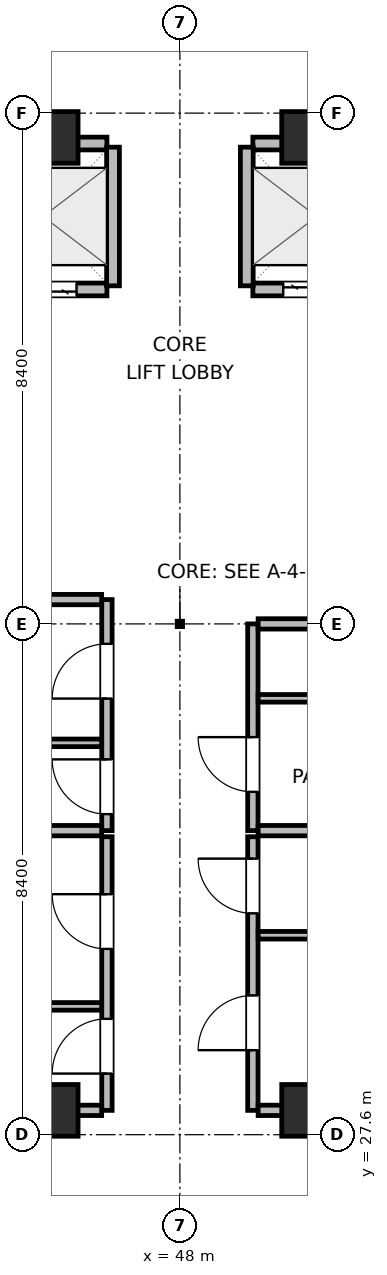
"""IFC4 building model, lengths in metres.
Left out: names, types, materials, properties, quantities, classifications, styles, units other than length and angle.
Written with IfcOpenShell. Run it as: python <this file> out.ifc"""

import sys

from ifc_helpers import new_model, si_unit, direction, frame, frame_2d, origin, origin_2d, place, context, subcontext, project, spatial, rectangle, extrude, element, fill, save


model = new_model("IFC4")
c1 = context("Model", 3, precision=1e-05, world=origin(), true_north=direction((0.0, 1.0)))
c2 = subcontext(c1, "Body", "Model", "MODEL_VIEW")
j1 = project(units=[si_unit("LENGTHUNIT", "METRE"), si_unit("PLANEANGLEUNIT", "RADIAN")], contexts=[c1])
p1 = place(None, origin())
s1 = spatial("IfcSite", under=j1, at=p1, CompositionType="ELEMENT")
p2 = place(p1, origin())
s2 = spatial("IfcBuilding", under=s1, at=p2, CompositionType="ELEMENT")
p3 = place(p2, frame((0.0, 0.0, 166.2)))
s3 = spatial("IfcBuildingStorey", under=s2, at=p3, CompositionType="ELEMENT", Elevation=166.2)
for number, where, z_axis, x_axis in (
    (1, (45.9, 28.0, 0.0), (0.0, 0.0, 1.0), (1.0, 0.0, 0.0)),
    (2, (50.1, 28.0, 0.0), (0.0, 0.0, 1.0), (1.0, 0.0, 0.0)),
    (3, (45.9, 44.0, 0.0), (0.0, 0.0, 1.0), (1.0, 0.0, 0.0)),
    (4, (50.1, 44.0, 0.0), (0.0, 0.0, 1.0), (1.0, 0.0, 0.0)),
):
    element("IfcColumn", number, at=place(p3, frame(where, z_axis=z_axis, x_axis=x_axis)), inside=s3, PredefinedType="COLUMN", context=c2, shape_type="SweptSolid", body=[
        extrude(rectangle(XDim=0.85, YDim=0.85, at=origin_2d()), origin(), (0.0, 0.0, 1.0), 3.9),
    ])
p4 = place(p3, frame((44.7, 41.5, 0.0), z_axis=(0.0, 0.0, 1.0), x_axis=(1.0, 0.0, 0.0)))
e5 = element("IfcWall", 5, at=p4, inside=s3, PredefinedType="PARTITIONING", context=c2, shape_type="SweptSolid", body=[
    extrude(rectangle(XDim=2.1, YDim=0.21, at=frame_2d((1.05, 0.0))), origin(), (0.0, 0.0, 1.0), 3.68),
])
p5 = place(p4, frame((0.5, 0.0, 0.0)))
e6 = element("IfcOpeningElement", 6, at=p5, cuts=e5, PredefinedType="OPENING", context=c2, shape_type="SweptSolid", body=[
    extrude(rectangle(XDim=1.1, YDim=2.04, at=frame_2d((0.55, 1.02))), frame((0.0, 0.115, 0.0), z_axis=(0.0, -1.0, 0.0), x_axis=(1.0, 0.0, 0.0)), (0.0, 0.0, 1.0), 0.23),
])
p6 = place(p3, frame((44.7, 43.9, 0.0), z_axis=(0.0, 0.0, 1.0), x_axis=(1.0, 0.0, 0.0)))
e7 = element("IfcWall", 7, at=p6, inside=s3, PredefinedType="PARTITIONING", context=c2, shape_type="SweptSolid", body=[
    extrude(rectangle(XDim=2.1, YDim=0.21, at=frame_2d((1.05, 0.0))), origin(), (0.0, 0.0, 1.0), 2.765),
])
p7 = place(p3, frame((46.9, 41.56, 0.0), z_axis=(0.0, 0.0, 1.0), x_axis=(0.0, 1.0, 0.0)))
e8 = element("IfcWall", 8, at=p7, inside=s3, PredefinedType="PARTITIONING", context=c2, shape_type="SweptSolid", body=[
    extrude(rectangle(XDim=2.28, YDim=0.21, at=frame_2d((1.14, 0.0))), origin(), (0.0, 0.0, 1.0), 3.68),
])
p8 = place(p3, frame((49.2, 41.5, 0.0), z_axis=(0.0, 0.0, 1.0), x_axis=(1.0, 0.0, 0.0)))
e9 = element("IfcWall", 9, at=p8, inside=s3, PredefinedType="PARTITIONING", context=c2, shape_type="SweptSolid", body=[
    extrude(rectangle(XDim=2.1, YDim=0.21, at=frame_2d((1.05, 0.0))), origin(), (0.0, 0.0, 1.0), 3.68),
])
p9 = place(p8, frame((0.5, 0.0, 0.0)))
e10 = element("IfcOpeningElement", 10, at=p9, cuts=e9, PredefinedType="OPENING", context=c2, shape_type="SweptSolid", body=[
    extrude(rectangle(XDim=1.1, YDim=2.04, at=frame_2d((0.55, 1.02))), frame((0.0, 0.115, 0.0), z_axis=(0.0, -1.0, 0.0), x_axis=(1.0, 0.0, 0.0)), (0.0, 0.0, 1.0), 0.23),
])
p10 = place(p3, frame((49.2, 43.9, 0.0), z_axis=(0.0, 0.0, 1.0), x_axis=(1.0, 0.0, 0.0)))
e11 = element("IfcWall", 11, at=p10, inside=s3, PredefinedType="PARTITIONING", context=c2, shape_type="SweptSolid", body=[
    extrude(rectangle(XDim=2.1, YDim=0.21, at=frame_2d((1.05, 0.0))), origin(), (0.0, 0.0, 1.0), 2.765),
])
p11 = place(p3, frame((49.1, 41.56, 0.0), z_axis=(0.0, 0.0, 1.0), x_axis=(0.0, 1.0, 0.0)))
e12 = element("IfcWall", 12, at=p11, inside=s3, PredefinedType="PARTITIONING", context=c2, shape_type="SweptSolid", body=[
    extrude(rectangle(XDim=2.28, YDim=0.21, at=frame_2d((1.14, 0.0))), origin(), (0.0, 0.0, 1.0), 3.68),
])
p12 = place(p3, frame((46.8, 32.6, 0.0), z_axis=(0.0, 0.0, 1.0), x_axis=(0.0, 1.0, 0.0)))
e13 = element("IfcWall", 13, at=p12, inside=s3, PredefinedType="PARTITIONING", context=c2, shape_type="SweptSolid", body=[
    extrude(rectangle(XDim=3.8, YDim=0.17, at=frame_2d((1.9, 0.0))), origin(), (0.0, 0.0, 1.0), 3.68),
])
p13 = place(p12, frame((0.272, 0.0, 0.0)))
e14 = element("IfcOpeningElement", 14, at=p13, cuts=e13, PredefinedType="OPENING", context=c2, shape_type="SweptSolid", body=[
    extrude(rectangle(XDim=0.9, YDim=2.02, at=frame_2d((0.45, 1.01))), frame((0.0, 0.095, 0.0), z_axis=(0.0, -1.0, 0.0), x_axis=(1.0, 0.0, 0.0)), (0.0, 0.0, 1.0), 0.19),
])
p14 = place(p12, frame((2.172, 0.0, 0.0)))
e15 = element("IfcOpeningElement", 15, at=p14, cuts=e13, PredefinedType="OPENING", context=c2, shape_type="SweptSolid", body=[
    extrude(rectangle(XDim=0.9, YDim=2.02, at=frame_2d((0.45, 1.01))), frame((0.0, 0.095, 0.0), z_axis=(0.0, -1.0, 0.0), x_axis=(1.0, 0.0, 0.0)), (0.0, 0.0, 1.0), 0.19),
])
for number, where, z_axis, x_axis in (
    (16, (43.8, 32.6, 0.0), (0.0, 0.0, 1.0), (1.0, 0.0, 0.0)),
    (17, (43.8, 36.4, 0.0), (0.0, 0.0, 1.0), (1.0, 0.0, 0.0)),
):
    element("IfcWall", number, at=place(p3, frame(where, z_axis=z_axis, x_axis=x_axis)), inside=s3, PredefinedType="PARTITIONING", context=c2, shape_type="SweptSolid", body=[
        extrude(rectangle(XDim=2.913, YDim=0.17, at=frame_2d((1.457, 0.0))), origin(), (0.0, 0.0, 1.0), 3.68),
    ])
p15 = place(p3, frame((43.8, 34.044, 0.0), z_axis=(0.0, 0.0, 1.0), x_axis=(1.0, 0.0, 0.0)))
e18 = element("IfcWall", 18, at=p15, inside=s3, PredefinedType="PARTITIONING", context=c2, shape_type="SweptSolid", body=[
    extrude(rectangle(XDim=2.913, YDim=0.125, at=frame_2d((1.457, 0.0))), origin(), (0.0, 0.0, 1.0), 3.68),
])
p16 = place(p3, frame((49.2, 32.6, 0.0), z_axis=(0.0, 0.0, 1.0), x_axis=(0.0, 1.0, 0.0)))
e19 = element("IfcWall", 19, at=p16, inside=s3, PredefinedType="PARTITIONING", context=c2, shape_type="SweptSolid", body=[
    extrude(rectangle(XDim=3.4, YDim=0.17, at=frame_2d((1.7, 0.0))), origin(), (0.0, 0.0, 1.0), 3.68),
])
p17 = place(p16, frame((0.638, 0.0, 0.0)))
e20 = element("IfcOpeningElement", 20, at=p17, cuts=e19, PredefinedType="OPENING", context=c2, shape_type="SweptSolid", body=[
    extrude(rectangle(XDim=0.9, YDim=2.02, at=frame_2d((0.45, 1.01))), frame((0.0, 0.095, 0.0), z_axis=(0.0, -1.0, 0.0), x_axis=(1.0, 0.0, 0.0)), (0.0, 0.0, 1.0), 0.19),
])
for number, where, z_axis, x_axis in (
    (21, (49.287, 32.6, 0.0), (0.0, 0.0, 1.0), (1.0, 0.0, 0.0)),
    (22, (49.287, 36.0, 0.0), (0.0, 0.0, 1.0), (1.0, 0.0, 0.0)),
):
    element("IfcWall", number, at=place(p3, frame(where, z_axis=z_axis, x_axis=x_axis)), inside=s3, PredefinedType="PARTITIONING", context=c2, shape_type="SweptSolid", body=[
        extrude(rectangle(XDim=2.913, YDim=0.17, at=frame_2d((1.457, 0.0))), origin(), (0.0, 0.0, 1.0), 3.68),
    ])
p18 = place(p3, frame((49.287, 34.776, 0.0), z_axis=(0.0, 0.0, 1.0), x_axis=(1.0, 0.0, 0.0)))
e23 = element("IfcWall", 23, at=p18, inside=s3, PredefinedType="PARTITIONING", context=c2, shape_type="SweptSolid", body=[
    extrude(rectangle(XDim=2.913, YDim=0.125, at=frame_2d((1.457, 0.0))), origin(), (0.0, 0.0, 1.0), 3.68),
])
p19 = place(p3, frame((46.8, 28.0, 0.0), z_axis=(0.0, 0.0, 1.0), x_axis=(0.0, 1.0, 0.0)))
e24 = element("IfcWall", 24, at=p19, inside=s3, PredefinedType="PARTITIONING", context=c2, shape_type="SweptSolid", body=[
    extrude(rectangle(XDim=4.5, YDim=0.17, at=frame_2d((2.25, 0.0))), origin(), (0.0, 0.0, 1.0), 3.68),
])
p20 = place(p19, frame((0.605, 0.0, 0.0)))
e25 = element("IfcOpeningElement", 25, at=p20, cuts=e24, PredefinedType="OPENING", context=c2, shape_type="SweptSolid", body=[
    extrude(rectangle(XDim=0.9, YDim=2.02, at=frame_2d((0.45, 1.01))), frame((0.0, 0.095, 0.0), z_axis=(0.0, -1.0, 0.0), x_axis=(1.0, 0.0, 0.0)), (0.0, 0.0, 1.0), 0.19),
])
p21 = place(p19, frame((2.655, 0.0, 0.0)))
e26 = element("IfcOpeningElement", 26, at=p21, cuts=e24, PredefinedType="OPENING", context=c2, shape_type="SweptSolid", body=[
    extrude(rectangle(XDim=0.9, YDim=2.02, at=frame_2d((0.45, 1.01))), frame((0.0, 0.095, 0.0), z_axis=(0.0, -1.0, 0.0), x_axis=(1.0, 0.0, 0.0)), (0.0, 0.0, 1.0), 0.19),
])
p22 = place(p3, frame((42.5, 28.0, 0.0), z_axis=(0.0, 0.0, 1.0), x_axis=(1.0, 0.0, 0.0)))
e27 = element("IfcWall", 27, at=p22, inside=s3, PredefinedType="PARTITIONING", context=c2, shape_type="SweptSolid", body=[
    extrude(rectangle(XDim=4.213, YDim=0.17, at=frame_2d((2.106, 0.0))), origin(), (0.0, 0.0, 1.0), 2.765),
])
p23 = place(p3, frame((42.5, 29.71, 0.0), z_axis=(0.0, 0.0, 1.0), x_axis=(1.0, 0.0, 0.0)))
e28 = element("IfcWall", 28, at=p23, inside=s3, PredefinedType="PARTITIONING", context=c2, shape_type="SweptSolid", body=[
    extrude(rectangle(XDim=4.213, YDim=0.125, at=frame_2d((2.106, 0.0))), origin(), (0.0, 0.0, 1.0), 3.68),
])
p24 = place(p3, frame((49.2, 28.0, 0.0), z_axis=(0.0, 0.0, 1.0), x_axis=(0.0, 1.0, 0.0)))
e29 = element("IfcWall", 29, at=p24, inside=s3, PredefinedType="PARTITIONING", context=c2, shape_type="SweptSolid", body=[
    extrude(rectangle(XDim=4.5, YDim=0.17, at=frame_2d((2.25, 0.0))), origin(), (0.0, 0.0, 1.0), 3.68),
])
p25 = place(p24, frame((0.99, 0.0, 0.0)))
e30 = element("IfcOpeningElement", 30, at=p25, cuts=e29, PredefinedType="OPENING", context=c2, shape_type="SweptSolid", body=[
    extrude(rectangle(XDim=0.9, YDim=2.02, at=frame_2d((0.45, 1.01))), frame((0.0, 0.095, 0.0), z_axis=(0.0, -1.0, 0.0), x_axis=(1.0, 0.0, 0.0)), (0.0, 0.0, 1.0), 0.19),
])
p26 = place(p24, frame((3.24, 0.0, 0.0)))
e31 = element("IfcOpeningElement", 31, at=p26, cuts=e29, PredefinedType="OPENING", context=c2, shape_type="SweptSolid", body=[
    extrude(rectangle(XDim=0.9, YDim=2.02, at=frame_2d((0.45, 1.01))), frame((0.0, 0.095, 0.0), z_axis=(0.0, -1.0, 0.0), x_axis=(1.0, 0.0, 0.0)), (0.0, 0.0, 1.0), 0.19),
])
p27 = place(p3, frame((49.287, 28.0, 0.0), z_axis=(0.0, 0.0, 1.0), x_axis=(1.0, 0.0, 0.0)))
e32 = element("IfcWall", 32, at=p27, inside=s3, PredefinedType="PARTITIONING", context=c2, shape_type="SweptSolid", body=[
    extrude(rectangle(XDim=4.213, YDim=0.17, at=frame_2d((2.106, 0.0))), origin(), (0.0, 0.0, 1.0), 2.765),
])
p28 = place(p3, frame((49.287, 30.88, 0.0), z_axis=(0.0, 0.0, 1.0), x_axis=(1.0, 0.0, 0.0)))
e33 = element("IfcWall", 33, at=p28, inside=s3, PredefinedType="PARTITIONING", context=c2, shape_type="SweptSolid", body=[
    extrude(rectangle(XDim=4.213, YDim=0.125, at=frame_2d((2.106, 0.0))), origin(), (0.0, 0.0, 1.0), 3.68),
])
p29 = place(p5, origin())
e34 = element("IfcDoor", 34, at=p29, inside=s3, OperationType="DOUBLE_DOOR_SLIDING", PredefinedType="DOOR", context=c2, shape_type="SweptSolid", body=[
    extrude(rectangle(XDim=1.1, YDim=2.04, at=frame_2d((0.55, 1.02))), frame((0.0, 0.025, 0.0), z_axis=(0.0, -1.0, 0.0), x_axis=(1.0, 0.0, 0.0)), (0.0, 0.0, 1.0), 0.05),
])
fill(e6, e34)
p30 = place(p9, origin())
e35 = element("IfcDoor", 35, at=p30, inside=s3, OperationType="DOUBLE_DOOR_SLIDING", PredefinedType="DOOR", context=c2, shape_type="SweptSolid", body=[
    extrude(rectangle(XDim=1.1, YDim=2.04, at=frame_2d((0.55, 1.02))), frame((0.0, 0.025, 0.0), z_axis=(0.0, -1.0, 0.0), x_axis=(1.0, 0.0, 0.0)), (0.0, 0.0, 1.0), 0.05),
])
fill(e10, e35)
p31 = place(p13, origin())
e36 = element("IfcDoor", 36, at=p31, inside=s3, OperationType="SINGLE_SWING_RIGHT", PredefinedType="DOOR", context=c2, shape_type="SweptSolid", body=[
    extrude(rectangle(XDim=0.9, YDim=2.02, at=frame_2d((0.45, 1.01))), frame((0.0, 0.025, 0.0), z_axis=(0.0, -1.0, 0.0), x_axis=(1.0, 0.0, 0.0)), (0.0, 0.0, 1.0), 0.05),
])
fill(e14, e36)
p32 = place(p14, origin())
e37 = element("IfcDoor", 37, at=p32, inside=s3, OperationType="SINGLE_SWING_LEFT", PredefinedType="DOOR", context=c2, shape_type="SweptSolid", body=[
    extrude(rectangle(XDim=0.9, YDim=2.02, at=frame_2d((0.45, 1.01))), frame((0.0, 0.025, 0.0), z_axis=(0.0, -1.0, 0.0), x_axis=(1.0, 0.0, 0.0)), (0.0, 0.0, 1.0), 0.05),
])
fill(e15, e37)
p33 = place(p17, origin())
e38 = element("IfcDoor", 38, at=p33, inside=s3, OperationType="SINGLE_SWING_RIGHT", PredefinedType="DOOR", context=c2, shape_type="SweptSolid", body=[
    extrude(rectangle(XDim=0.9, YDim=2.02, at=frame_2d((0.45, 1.01))), frame((0.0, 0.025, 0.0), z_axis=(0.0, -1.0, 0.0), x_axis=(1.0, 0.0, 0.0)), (0.0, 0.0, 1.0), 0.05),
])
fill(e20, e38)
p34 = place(p20, origin())
e39 = element("IfcDoor", 39, at=p34, inside=s3, OperationType="SINGLE_SWING_LEFT", PredefinedType="DOOR", context=c2, shape_type="SweptSolid", body=[
    extrude(rectangle(XDim=0.9, YDim=2.02, at=frame_2d((0.45, 1.01))), frame((0.0, 0.025, 0.0), z_axis=(0.0, -1.0, 0.0), x_axis=(1.0, 0.0, 0.0)), (0.0, 0.0, 1.0), 0.05),
])
fill(e25, e39)
p35 = place(p21, origin())
e40 = element("IfcDoor", 40, at=p35, inside=s3, OperationType="SINGLE_SWING_RIGHT", PredefinedType="DOOR", context=c2, shape_type="SweptSolid", body=[
    extrude(rectangle(XDim=0.9, YDim=2.02, at=frame_2d((0.45, 1.01))), frame((0.0, 0.025, 0.0), z_axis=(0.0, -1.0, 0.0), x_axis=(1.0, 0.0, 0.0)), (0.0, 0.0, 1.0), 0.05),
])
fill(e26, e40)
p36 = place(p25, origin())
e41 = element("IfcDoor", 41, at=p36, inside=s3, OperationType="SINGLE_SWING_LEFT", PredefinedType="DOOR", context=c2, shape_type="SweptSolid", body=[
    extrude(rectangle(XDim=0.9, YDim=2.02, at=frame_2d((0.45, 1.01))), frame((0.0, 0.025, 0.0), z_axis=(0.0, -1.0, 0.0), x_axis=(1.0, 0.0, 0.0)), (0.0, 0.0, 1.0), 0.05),
])
fill(e30, e41)
p37 = place(p26, origin())
e42 = element("IfcDoor", 42, at=p37, inside=s3, OperationType="SINGLE_SWING_RIGHT", PredefinedType="DOOR", context=c2, shape_type="SweptSolid", body=[
    extrude(rectangle(XDim=0.9, YDim=2.02, at=frame_2d((0.45, 1.01))), frame((0.0, 0.025, 0.0), z_axis=(0.0, -1.0, 0.0), x_axis=(1.0, 0.0, 0.0)), (0.0, 0.0, 1.0), 0.05),
])
fill(e31, e42)
save(model, sys.argv[1])
